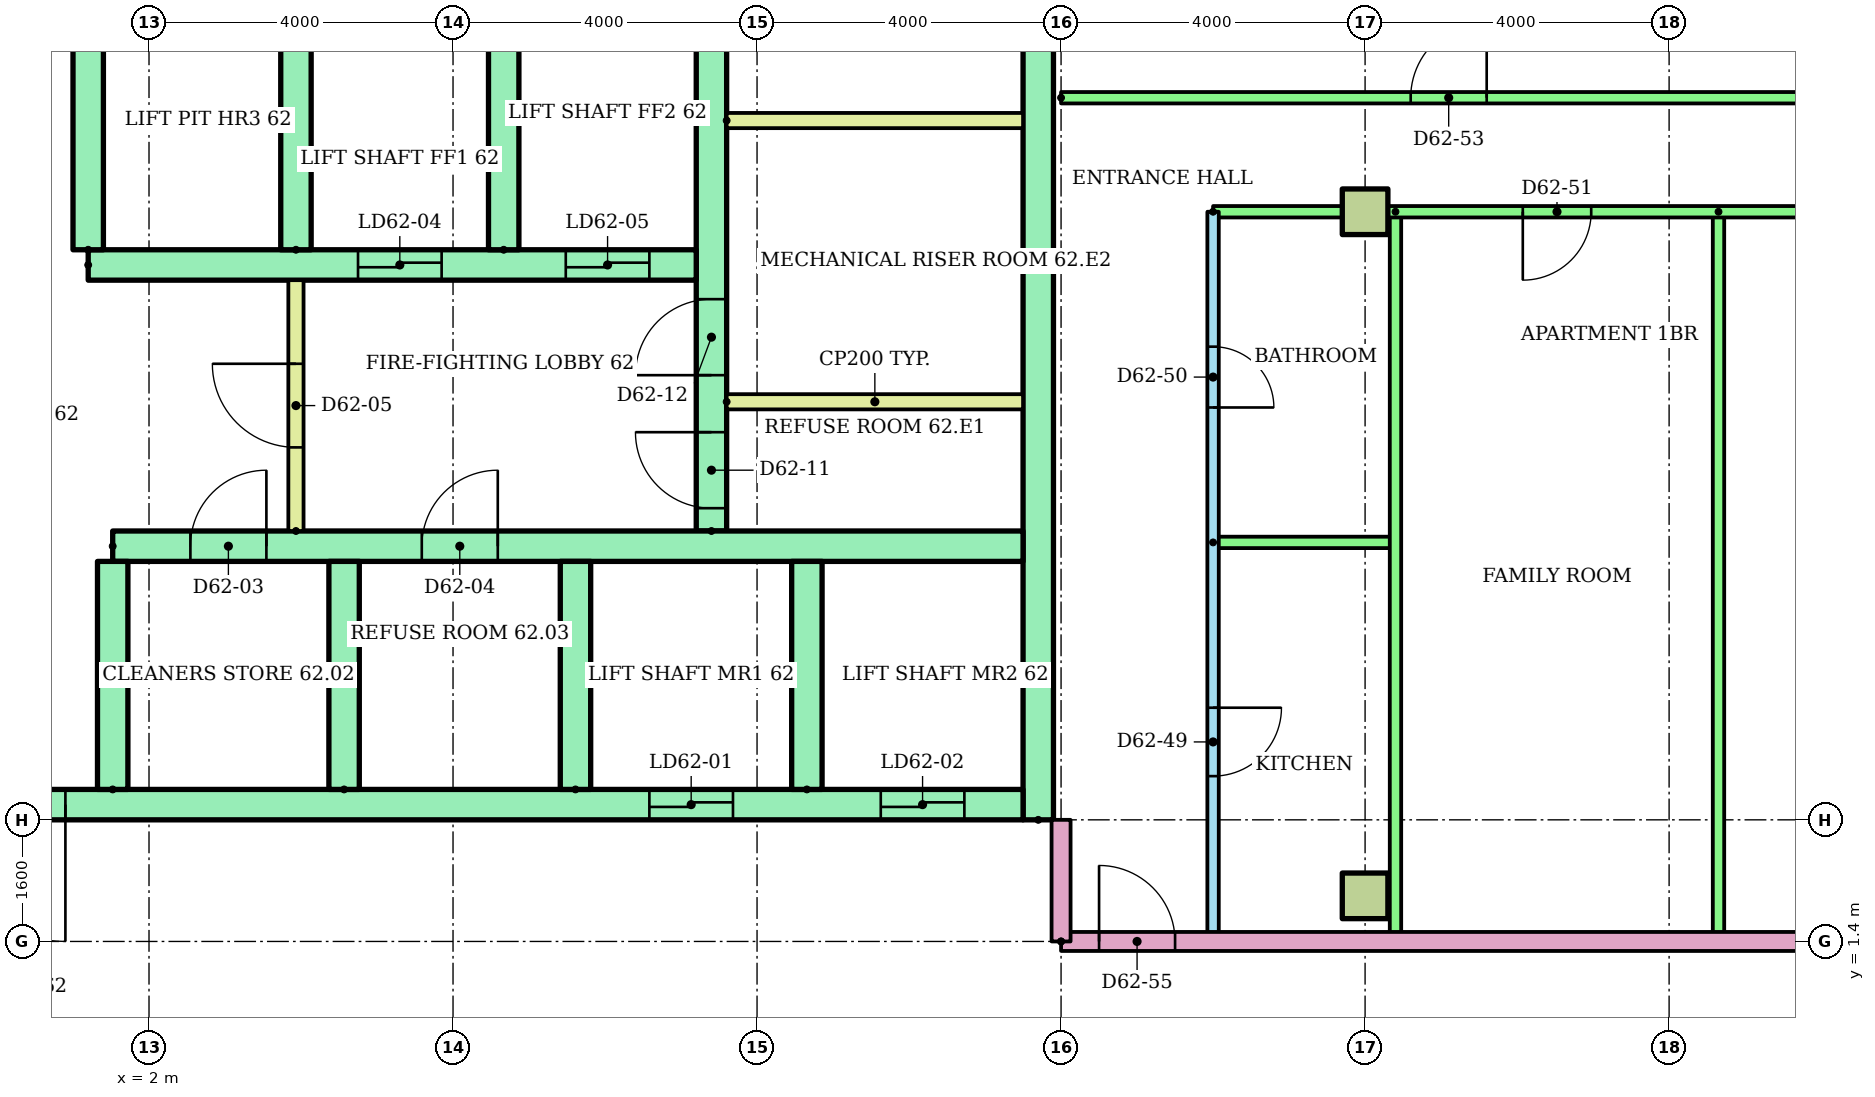
"""IFC4 building model, lengths in metres.
Left out: names, types, materials, properties, quantities, classifications, styles, units other than length and angle.
Written with IfcOpenShell. Run it as: python <this file> out.ifc"""

import sys

from ifc_helpers import new_model, si_unit, direction, frame, frame_2d, origin, origin_2d, place, context, subcontext, project, spatial, rectangle, extrude, element, fill, save


model = new_model("IFC4")
c1 = context("Model", 3, precision=1e-05, world=origin(), true_north=direction((0.0, 1.0)))
c2 = subcontext(c1, "Body", "Model", "MODEL_VIEW")
j1 = project(units=[si_unit("LENGTHUNIT", "METRE"), si_unit("PLANEANGLEUNIT", "RADIAN")], contexts=[c1])
p1 = place(None, origin())
s1 = spatial("IfcSite", under=j1, at=p1, CompositionType="ELEMENT")
p2 = place(p1, origin())
s2 = spatial("IfcBuilding", under=s1, at=p2, CompositionType="ELEMENT")
p3 = place(p2, frame((0.0, 0.0, 236.4)))
s3 = spatial("IfcBuildingStorey", under=s2, at=p3, CompositionType="ELEMENT", Elevation=236.4)
for number, where in (
    (1, (18.0, 2.0, 0.0)),
    (2, (18.0, 11.0, 0.0)),
):
    element("IfcColumn", number, at=place(p3, frame(where)), inside=s3, PredefinedType="COLUMN", context=c2, shape_type="SweptSolid", body=[
        extrude(rectangle(XDim=0.6, YDim=0.6, at=origin_2d()), origin(), (0.0, 0.0, 1.0), 3.2),
    ])
p4 = place(p3, frame((13.7, 3.0, 0.0), z_axis=(0.0, 0.0, 1.0), x_axis=(0.0, 1.0, 0.0)))
e3 = element("IfcWall", 3, at=p4, inside=s3, PredefinedType="SHEAR", context=c2, shape_type="SweptSolid", body=[
    extrude(rectangle(XDim=17.0, YDim=0.4, at=frame_2d((8.5, 0.0))), origin(), (0.0, 0.0, 1.0), 2.8),
])
p5 = place(p3, frame((9.4, 6.8, 0.0), z_axis=(0.0, 0.0, 1.0), x_axis=(0.0, 1.0, 0.0)))
e4 = element("IfcWall", 4, at=p5, inside=s3, PredefinedType="SHEAR", context=c2, shape_type="SweptSolid", body=[
    extrude(rectangle(XDim=12.7, YDim=0.4, at=frame_2d((6.35, 0.0))), origin(), (0.0, 0.0, 1.0), 2.8),
])
p6 = place(p5, frame((0.3, 0.0, 0.0)))
e5 = element("IfcOpeningElement", 5, at=p6, cuts=e4, PredefinedType="OPENING", context=c2, shape_type="SweptSolid", body=[
    extrude(rectangle(XDim=1.0, YDim=2.1, at=frame_2d((0.5, 1.05))), frame((0.0, 0.21, 0.0), z_axis=(0.0, -1.0, 0.0), x_axis=(1.0, 0.0, 0.0)), (0.0, 0.0, 1.0), 0.42),
])
p7 = place(p5, frame((2.05, 0.0, 0.0)))
e6 = element("IfcOpeningElement", 6, at=p7, cuts=e4, PredefinedType="OPENING", context=c2, shape_type="SweptSolid", body=[
    extrude(rectangle(XDim=1.0, YDim=2.1, at=frame_2d((0.5, 1.05))), frame((0.0, 0.21, 0.0), z_axis=(0.0, -1.0, 0.0), x_axis=(1.0, 0.0, 0.0)), (0.0, 0.0, 1.0), 0.42),
])
p8 = place(p5, frame((7.925, 0.0, 0.0)))
e7 = element("IfcOpeningElement", 7, at=p8, cuts=e4, PredefinedType="OPENING", context=c2, shape_type="SweptSolid", body=[
    extrude(rectangle(XDim=1.0, YDim=2.1, at=frame_2d((0.5, 1.05))), frame((0.0, 0.21, 0.0), z_axis=(0.0, -1.0, 0.0), x_axis=(1.0, 0.0, 0.0)), (0.0, 0.0, 1.0), 0.42),
])
p9 = place(p3, frame((-13.5, 3.2, 0.0)))
e8 = element("IfcWall", 8, at=p9, inside=s3, PredefinedType="SHEAR", context=c2, shape_type="SweptSolid", body=[
    extrude(rectangle(XDim=27.0, YDim=0.4, at=frame_2d((13.5, 0.0))), origin(), (0.0, 0.0, 1.0), 2.8),
])
p10 = place(p9, frame((22.083, 0.0, 0.0)))
e9 = element("IfcOpeningElement", 9, at=p10, cuts=e8, PredefinedType="OPENING", context=c2, shape_type="SweptSolid", body=[
    extrude(rectangle(XDim=1.1, YDim=2.1, at=frame_2d((0.55, 1.05))), frame((0.0, 0.21, 0.0), z_axis=(0.0, -1.0, 0.0), x_axis=(1.0, 0.0, 0.0)), (0.0, 0.0, 1.0), 0.42),
])
p11 = place(p9, frame((25.128, 0.0, 0.0)))
e10 = element("IfcOpeningElement", 10, at=p11, cuts=e8, PredefinedType="OPENING", context=c2, shape_type="SweptSolid", body=[
    extrude(rectangle(XDim=1.1, YDim=2.1, at=frame_2d((0.55, 1.05))), frame((0.0, 0.21, 0.0), z_axis=(0.0, -1.0, 0.0), x_axis=(1.0, 0.0, 0.0)), (0.0, 0.0, 1.0), 0.42),
])
p12 = place(p9, frame((12.6, 0.0, 0.0)))
e11 = element("IfcOpeningElement", 11, at=p12, cuts=e8, PredefinedType="OPENING", context=c2, shape_type="SweptSolid", body=[
    extrude(rectangle(XDim=1.8, YDim=2.1, at=frame_2d((0.9, 1.05))), frame((0.0, 0.21, 0.0), z_axis=(0.0, -1.0, 0.0), x_axis=(1.0, 0.0, 0.0)), (0.0, 0.0, 1.0), 0.42),
])
p13 = place(p3, frame((1.522, 6.6, 0.0)))
e12 = element("IfcWall", 12, at=p13, inside=s3, PredefinedType="SHEAR", context=c2, shape_type="SweptSolid", body=[
    extrude(rectangle(XDim=11.978, YDim=0.4, at=frame_2d((5.989, 0.0))), origin(), (0.0, 0.0, 1.0), 2.8),
])
p14 = place(p13, frame((1.022, 0.0, 0.0)))
e13 = element("IfcOpeningElement", 13, at=p14, cuts=e12, PredefinedType="OPENING", context=c2, shape_type="SweptSolid", body=[
    extrude(rectangle(XDim=1.0, YDim=2.1, at=frame_2d((0.5, 1.05))), frame((0.0, 0.21, 0.0), z_axis=(0.0, -1.0, 0.0), x_axis=(1.0, 0.0, 0.0)), (0.0, 0.0, 1.0), 0.42),
])
p15 = place(p13, frame((4.067, 0.0, 0.0)))
e14 = element("IfcOpeningElement", 14, at=p15, cuts=e12, PredefinedType="OPENING", context=c2, shape_type="SweptSolid", body=[
    extrude(rectangle(XDim=1.0, YDim=2.1, at=frame_2d((0.5, 1.05))), frame((0.0, 0.21, 0.0), z_axis=(0.0, -1.0, 0.0), x_axis=(1.0, 0.0, 0.0)), (0.0, 0.0, 1.0), 0.42),
])
for number, where, z_axis, x_axis in (
    (15, (1.522, 3.4, 0.0), (0.0, 0.0, 1.0), (0.0, 1.0, 0.0)),
    (16, (4.567, 3.4, 0.0), (0.0, 0.0, 1.0), (0.0, 1.0, 0.0)),
    (17, (7.611, 3.4, 0.0), (0.0, 0.0, 1.0), (0.0, 1.0, 0.0)),
    (18, (10.656, 3.4, 0.0), (0.0, 0.0, 1.0), (0.0, 1.0, 0.0)),
):
    element("IfcWall", number, at=place(p3, frame(where, z_axis=z_axis, x_axis=x_axis)), inside=s3, PredefinedType="SHEAR", context=c2, shape_type="SweptSolid", body=[
        extrude(rectangle(XDim=3.0, YDim=0.4, at=frame_2d((1.5, 0.0))), origin(), (0.0, 0.0, 1.0), 2.8),
    ])
p16 = place(p3, frame((1.2, 10.3, 0.0)))
e19 = element("IfcWall", 19, at=p16, inside=s3, PredefinedType="SHEAR", context=c2, shape_type="SweptSolid", body=[
    extrude(rectangle(XDim=8.0, YDim=0.4, at=frame_2d((4.0, 0.0))), origin(), (0.0, 0.0, 1.0), 2.8),
])
p17 = place(p16, frame((3.55, 0.0, 0.0)))
e20 = element("IfcOpeningElement", 20, at=p17, cuts=e19, PredefinedType="OPENING", context=c2, shape_type="SweptSolid", body=[
    extrude(rectangle(XDim=1.1, YDim=2.1, at=frame_2d((0.55, 1.05))), frame((0.0, 0.21, 0.0), z_axis=(0.0, -1.0, 0.0), x_axis=(1.0, 0.0, 0.0)), (0.0, 0.0, 1.0), 0.42),
])
p18 = place(p16, frame((6.283, 0.0, 0.0)))
e21 = element("IfcOpeningElement", 21, at=p18, cuts=e19, PredefinedType="OPENING", context=c2, shape_type="SweptSolid", body=[
    extrude(rectangle(XDim=1.1, YDim=2.1, at=frame_2d((0.55, 1.05))), frame((0.0, 0.21, 0.0), z_axis=(0.0, -1.0, 0.0), x_axis=(1.0, 0.0, 0.0)), (0.0, 0.0, 1.0), 0.42),
])
for number, where, z_axis, x_axis in (
    (22, (1.2, 10.5, 0.0), (0.0, 0.0, 1.0), (0.0, 1.0, 0.0)),
    (23, (3.933, 10.5, 0.0), (0.0, 0.0, 1.0), (0.0, 1.0, 0.0)),
    (24, (6.667, 10.5, 0.0), (0.0, 0.0, 1.0), (0.0, 1.0, 0.0)),
):
    element("IfcWall", number, at=place(p3, frame(where, z_axis=z_axis, x_axis=x_axis)), inside=s3, PredefinedType="SHEAR", context=c2, shape_type="SweptSolid", body=[
        extrude(rectangle(XDim=3.0, YDim=0.4, at=frame_2d((1.5, 0.0))), origin(), (0.0, 0.0, 1.0), 2.8),
    ])
p19 = place(p3, frame((3.933, 6.8, 0.0), z_axis=(0.0, 0.0, 1.0), x_axis=(0.0, 1.0, 0.0)))
e25 = element("IfcWall", 25, at=p19, inside=s3, PredefinedType="PARTITIONING", context=c2, shape_type="SweptSolid", body=[
    extrude(rectangle(XDim=3.3, YDim=0.2, at=frame_2d((1.65, 0.0))), origin(), (0.0, 0.0, 1.0), 2.8),
])
p20 = place(p19, frame((1.1, 0.0, 0.0)))
e26 = element("IfcOpeningElement", 26, at=p20, cuts=e25, PredefinedType="OPENING", context=c2, shape_type="SweptSolid", body=[
    extrude(rectangle(XDim=1.1, YDim=2.1, at=frame_2d((0.55, 1.05))), frame((0.0, 0.11, 0.0), z_axis=(0.0, -1.0, 0.0), x_axis=(1.0, 0.0, 0.0)), (0.0, 0.0, 1.0), 0.22),
])
for number, where in (
    (27, (9.6, 8.5, 0.0)),
    (28, (9.6, 12.2, 0.0)),
):
    element("IfcWall", number, at=place(p3, frame(where)), inside=s3, PredefinedType="PARTITIONING", context=c2, shape_type="SweptSolid", body=[
        extrude(rectangle(XDim=3.9, YDim=0.2, at=frame_2d((1.95, 0.0))), origin(), (0.0, 0.0, 1.0), 2.8),
    ])
p21 = place(p3, frame((16.0, 11.0, 0.0), z_axis=(0.0, 0.0, 1.0), x_axis=(0.0, -1.0, 0.0)))
e29 = element("IfcWall", 29, at=p21, inside=s3, PredefinedType="PARTITIONING", context=c2, shape_type="SweptSolid", body=[
    extrude(rectangle(XDim=9.6, YDim=0.15, at=frame_2d((4.8, 0.0))), origin(), (0.0, 0.0, 1.0), 2.4),
])
p22 = place(p21, frame((6.525, 0.0, 0.0)))
e30 = element("IfcOpeningElement", 30, at=p22, cuts=e29, PredefinedType="OPENING", context=c2, shape_type="SweptSolid", body=[
    extrude(rectangle(XDim=0.9, YDim=2.1, at=frame_2d((0.45, 1.05))), frame((0.0, 0.085, 0.0), z_axis=(0.0, -1.0, 0.0), x_axis=(1.0, 0.0, 0.0)), (0.0, 0.0, 1.0), 0.17),
])
p23 = place(p21, frame((1.775, 0.0, 0.0)))
e31 = element("IfcOpeningElement", 31, at=p23, cuts=e29, PredefinedType="OPENING", context=c2, shape_type="SweptSolid", body=[
    extrude(rectangle(XDim=0.8, YDim=2.1, at=frame_2d((0.4, 1.05))), frame((0.0, 0.085, 0.0), z_axis=(0.0, -1.0, 0.0), x_axis=(1.0, 0.0, 0.0)), (0.0, 0.0, 1.0), 0.17),
])
p24 = place(p3, frame((16.0, 6.65, 0.0)))
e32 = element("IfcWall", 32, at=p24, inside=s3, PredefinedType="PARTITIONING", context=c2, shape_type="SweptSolid", body=[
    extrude(rectangle(XDim=2.4, YDim=0.15, at=frame_2d((1.2, 0.0))), origin(), (0.0, 0.0, 1.0), 2.4),
])
for number, where, z_axis, x_axis in (
    (33, (18.4, 11.0, 0.0), (0.0, 0.0, 1.0), (0.0, -1.0, 0.0)),
    (34, (22.65, 11.0, 0.0), (0.0, 0.0, 1.0), (0.0, -1.0, 0.0)),
):
    element("IfcWall", number, at=place(p3, frame(where, z_axis=z_axis, x_axis=x_axis)), inside=s3, PredefinedType="PARTITIONING", context=c2, shape_type="SweptSolid", body=[
        extrude(rectangle(XDim=9.6, YDim=0.15, at=frame_2d((4.8, 0.0))), origin(), (0.0, 0.0, 1.0), 2.4),
    ])
p25 = place(p3, frame((28.91, 11.0, 0.0), z_axis=(0.0, 0.0, 1.0), x_axis=(-1.0, 0.0, 0.0)))
e35 = element("IfcWall", 35, at=p25, inside=s3, PredefinedType="PARTITIONING", context=c2, shape_type="SweptSolid", body=[
    extrude(rectangle(XDim=12.91, YDim=0.15, at=frame_2d((6.455, 0.0))), origin(), (0.0, 0.0, 1.0), 2.4),
])
p26 = place(p25, frame((7.935, 0.0, 0.0)))
e36 = element("IfcOpeningElement", 36, at=p26, cuts=e35, PredefinedType="OPENING", context=c2, shape_type="SweptSolid", body=[
    extrude(rectangle(XDim=0.9, YDim=2.1, at=frame_2d((0.45, 1.05))), frame((0.0, 0.085, 0.0), z_axis=(0.0, -1.0, 0.0), x_axis=(1.0, 0.0, 0.0)), (0.0, 0.0, 1.0), 0.17),
])
p27 = place(p25, frame((3.386, 0.0, 0.0)))
e37 = element("IfcOpeningElement", 37, at=p27, cuts=e35, PredefinedType="OPENING", context=c2, shape_type="SweptSolid", body=[
    extrude(rectangle(XDim=0.9, YDim=2.1, at=frame_2d((0.45, 1.05))), frame((0.0, 0.085, 0.0), z_axis=(0.0, -1.0, 0.0), x_axis=(1.0, 0.0, 0.0)), (0.0, 0.0, 1.0), 0.17),
])
p28 = place(p3, frame((14.0, 12.5, 0.0)))
e38 = element("IfcWall", 38, at=p28, inside=s3, PredefinedType="PARTITIONING", context=c2, shape_type="SweptSolid", body=[
    extrude(rectangle(XDim=14.92, YDim=0.15, at=frame_2d((7.46, 0.0))), origin(), (0.0, 0.0, 1.0), 2.4),
])
p29 = place(p28, frame((4.6, 0.0, 0.0)))
e39 = element("IfcOpeningElement", 39, at=p29, cuts=e38, PredefinedType="OPENING", context=c2, shape_type="SweptSolid", body=[
    extrude(rectangle(XDim=1.0, YDim=2.1, at=frame_2d((0.5, 1.05))), frame((0.0, 0.085, 0.0), z_axis=(0.0, -1.0, 0.0), x_axis=(1.0, 0.0, 0.0)), (0.0, 0.0, 1.0), 0.17),
])
p30 = place(p28, frame((12.476, 0.0, 0.0)))
e40 = element("IfcOpeningElement", 40, at=p30, cuts=e38, PredefinedType="OPENING", context=c2, shape_type="SweptSolid", body=[
    extrude(rectangle(XDim=0.9, YDim=2.1, at=frame_2d((0.45, 1.05))), frame((0.0, 0.085, 0.0), z_axis=(0.0, -1.0, 0.0), x_axis=(1.0, 0.0, 0.0)), (0.0, 0.0, 1.0), 0.17),
])
p31 = place(p3, frame((14.0, 1.4, 0.0)))
e41 = element("IfcWall", 41, at=p31, inside=s3, PredefinedType="PARTITIONING", context=c2, shape_type="SweptSolid", body=[
    extrude(rectangle(XDim=14.92, YDim=0.25, at=frame_2d((7.46, 0.0))), origin(), (0.0, 0.0, 1.0), 2.4),
])
p32 = place(p31, frame((0.5, 0.0, 0.0)))
e42 = element("IfcOpeningElement", 42, at=p32, cuts=e41, PredefinedType="OPENING", context=c2, shape_type="SweptSolid", body=[
    extrude(rectangle(XDim=1.0, YDim=2.1, at=frame_2d((0.5, 1.05))), frame((0.0, 0.135, 0.0), z_axis=(0.0, -1.0, 0.0), x_axis=(1.0, 0.0, 0.0)), (0.0, 0.0, 1.0), 0.27),
])
p33 = place(p3, frame((14.0, 1.4, 0.0), z_axis=(0.0, 0.0, 1.0), x_axis=(0.0, 1.0, 0.0)))
e43 = element("IfcWall", 43, at=p33, inside=s3, PredefinedType="PARTITIONING", context=c2, shape_type="SweptSolid", body=[
    extrude(rectangle(XDim=1.6, YDim=0.25, at=frame_2d((0.8, 0.0))), origin(), (0.0, 0.0, 1.0), 2.4),
])
p34 = place(p10, origin())
e44 = element("IfcDoor", 44, at=p34, inside=s3, OperationType="SLIDING_TO_LEFT", PredefinedType="DOOR", context=c2, shape_type="SweptSolid", body=[
    extrude(rectangle(XDim=1.1, YDim=2.1, at=frame_2d((0.55, 1.05))), frame((0.0, 0.025, 0.0), z_axis=(0.0, -1.0, 0.0), x_axis=(1.0, 0.0, 0.0)), (0.0, 0.0, 1.0), 0.05),
])
fill(e9, e44)
p35 = place(p11, origin())
e45 = element("IfcDoor", 45, at=p35, inside=s3, OperationType="SLIDING_TO_LEFT", PredefinedType="DOOR", context=c2, shape_type="SweptSolid", body=[
    extrude(rectangle(XDim=1.1, YDim=2.1, at=frame_2d((0.55, 1.05))), frame((0.0, 0.025, 0.0), z_axis=(0.0, -1.0, 0.0), x_axis=(1.0, 0.0, 0.0)), (0.0, 0.0, 1.0), 0.05),
])
fill(e10, e45)
p36 = place(p12, frame((1.8, 0.0, 0.0), z_axis=(0.0, 0.0, 1.0), x_axis=(-1.0, 0.0, 0.0)))
e46 = element("IfcDoor", 46, at=p36, inside=s3, OperationType="DOUBLE_DOOR_SINGLE_SWING", PredefinedType="DOOR", context=c2, shape_type="SweptSolid", body=[
    extrude(rectangle(XDim=1.8, YDim=2.1, at=frame_2d((0.9, 1.05))), frame((0.0, 0.025, 0.0), z_axis=(0.0, -1.0, 0.0), x_axis=(1.0, 0.0, 0.0)), (0.0, 0.0, 1.0), 0.05),
])
fill(e11, e46)
p37 = place(p14, origin())
e47 = element("IfcDoor", 47, at=p37, inside=s3, OperationType="SINGLE_SWING_RIGHT", PredefinedType="DOOR", context=c2, shape_type="SweptSolid", body=[
    extrude(rectangle(XDim=1.0, YDim=2.1, at=frame_2d((0.5, 1.05))), frame((0.0, 0.025, 0.0), z_axis=(0.0, -1.0, 0.0), x_axis=(1.0, 0.0, 0.0)), (0.0, 0.0, 1.0), 0.05),
])
fill(e13, e47)
p38 = place(p15, origin())
e48 = element("IfcDoor", 48, at=p38, inside=s3, OperationType="SINGLE_SWING_RIGHT", PredefinedType="DOOR", context=c2, shape_type="SweptSolid", body=[
    extrude(rectangle(XDim=1.0, YDim=2.1, at=frame_2d((0.5, 1.05))), frame((0.0, 0.025, 0.0), z_axis=(0.0, -1.0, 0.0), x_axis=(1.0, 0.0, 0.0)), (0.0, 0.0, 1.0), 0.05),
])
fill(e14, e48)
p39 = place(p17, origin())
e49 = element("IfcDoor", 49, at=p39, inside=s3, OperationType="SLIDING_TO_LEFT", PredefinedType="DOOR", context=c2, shape_type="SweptSolid", body=[
    extrude(rectangle(XDim=1.1, YDim=2.1, at=frame_2d((0.55, 1.05))), frame((0.0, 0.025, 0.0), z_axis=(0.0, -1.0, 0.0), x_axis=(1.0, 0.0, 0.0)), (0.0, 0.0, 1.0), 0.05),
])
fill(e20, e49)
p40 = place(p18, origin())
e50 = element("IfcDoor", 50, at=p40, inside=s3, OperationType="SLIDING_TO_LEFT", PredefinedType="DOOR", context=c2, shape_type="SweptSolid", body=[
    extrude(rectangle(XDim=1.1, YDim=2.1, at=frame_2d((0.55, 1.05))), frame((0.0, 0.025, 0.0), z_axis=(0.0, -1.0, 0.0), x_axis=(1.0, 0.0, 0.0)), (0.0, 0.0, 1.0), 0.05),
])
fill(e21, e50)
p41 = place(p20, origin())
e51 = element("IfcDoor", 51, at=p41, inside=s3, OperationType="SINGLE_SWING_RIGHT", PredefinedType="DOOR", context=c2, shape_type="SweptSolid", body=[
    extrude(rectangle(XDim=1.1, YDim=2.1, at=frame_2d((0.55, 1.05))), frame((0.0, 0.025, 0.0), z_axis=(0.0, -1.0, 0.0), x_axis=(1.0, 0.0, 0.0)), (0.0, 0.0, 1.0), 0.05),
])
fill(e26, e51)
p42 = place(p6, origin())
e52 = element("IfcDoor", 52, at=p42, inside=s3, OperationType="SINGLE_SWING_RIGHT", PredefinedType="DOOR", context=c2, shape_type="SweptSolid", body=[
    extrude(rectangle(XDim=1.0, YDim=2.1, at=frame_2d((0.5, 1.05))), frame((0.0, 0.025, 0.0), z_axis=(0.0, -1.0, 0.0), x_axis=(1.0, 0.0, 0.0)), (0.0, 0.0, 1.0), 0.05),
])
fill(e5, e52)
p43 = place(p7, origin())
e53 = element("IfcDoor", 53, at=p43, inside=s3, OperationType="SINGLE_SWING_LEFT", PredefinedType="DOOR", context=c2, shape_type="SweptSolid", body=[
    extrude(rectangle(XDim=1.0, YDim=2.1, at=frame_2d((0.5, 1.05))), frame((0.0, 0.025, 0.0), z_axis=(0.0, -1.0, 0.0), x_axis=(1.0, 0.0, 0.0)), (0.0, 0.0, 1.0), 0.05),
])
fill(e6, e53)
p44 = place(p22, origin())
e54 = element("IfcDoor", 54, at=p44, inside=s3, OperationType="SINGLE_SWING_LEFT", PredefinedType="DOOR", context=c2, shape_type="SweptSolid", body=[
    extrude(rectangle(XDim=0.9, YDim=2.1, at=frame_2d((0.45, 1.05))), frame((0.0, 0.025, 0.0), z_axis=(0.0, -1.0, 0.0), x_axis=(1.0, 0.0, 0.0)), (0.0, 0.0, 1.0), 0.05),
])
fill(e30, e54)
p45 = place(p23, origin())
e55 = element("IfcDoor", 55, at=p45, inside=s3, OperationType="SINGLE_SWING_RIGHT", PredefinedType="DOOR", context=c2, shape_type="SweptSolid", body=[
    extrude(rectangle(XDim=0.8, YDim=2.1, at=frame_2d((0.4, 1.05))), frame((0.0, 0.025, 0.0), z_axis=(0.0, -1.0, 0.0), x_axis=(1.0, 0.0, 0.0)), (0.0, 0.0, 1.0), 0.05),
])
fill(e31, e55)
p46 = place(p26, origin())
e56 = element("IfcDoor", 56, at=p46, inside=s3, OperationType="SINGLE_SWING_RIGHT", PredefinedType="DOOR", context=c2, shape_type="SweptSolid", body=[
    extrude(rectangle(XDim=0.9, YDim=2.1, at=frame_2d((0.45, 1.05))), frame((0.0, 0.025, 0.0), z_axis=(0.0, -1.0, 0.0), x_axis=(1.0, 0.0, 0.0)), (0.0, 0.0, 1.0), 0.05),
])
fill(e36, e56)
p47 = place(p29, origin())
e57 = element("IfcDoor", 57, at=p47, inside=s3, OperationType="SINGLE_SWING_RIGHT", PredefinedType="DOOR", context=c2, shape_type="SweptSolid", body=[
    extrude(rectangle(XDim=1.0, YDim=2.1, at=frame_2d((0.5, 1.05))), frame((0.0, 0.025, 0.0), z_axis=(0.0, -1.0, 0.0), x_axis=(1.0, 0.0, 0.0)), (0.0, 0.0, 1.0), 0.05),
])
fill(e39, e57)
p48 = place(p32, origin())
e58 = element("IfcDoor", 58, at=p48, inside=s3, OperationType="SINGLE_SWING_LEFT", PredefinedType="DOOR", context=c2, shape_type="SweptSolid", body=[
    extrude(rectangle(XDim=1.0, YDim=2.1, at=frame_2d((0.5, 1.05))), frame((0.0, 0.025, 0.0), z_axis=(0.0, -1.0, 0.0), x_axis=(1.0, 0.0, 0.0)), (0.0, 0.0, 1.0), 0.05),
])
fill(e42, e58)
save(model, sys.argv[1])
